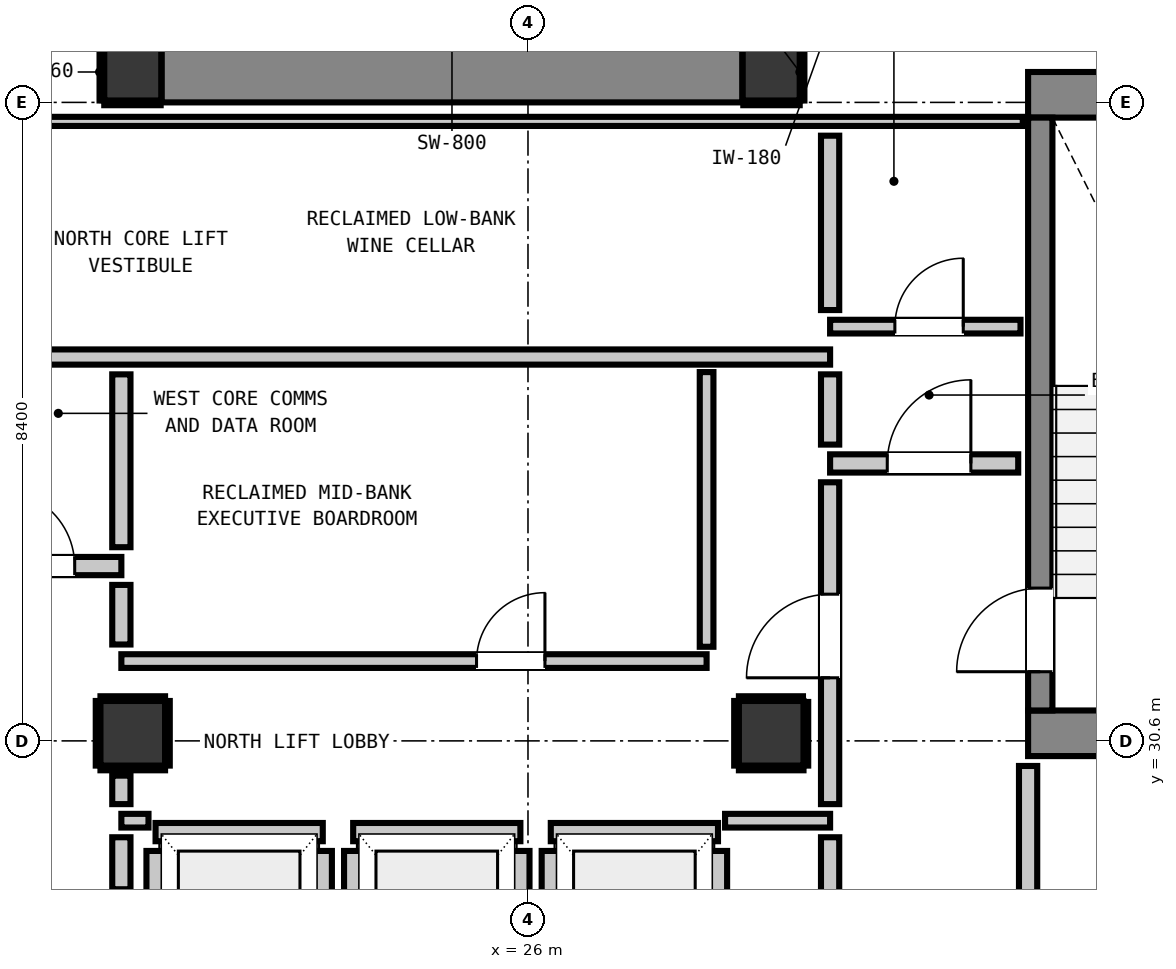
"""IFC4 building model, lengths in metres.
Left out: names, types, materials, properties, quantities, classifications, styles, units other than length and angle.
Written with IfcOpenShell. Run it as: python <this file> out.ifc"""

import sys

from ifc_helpers import new_model, si_unit, direction, frame, frame_2d, origin, origin_2d, place, context, subcontext, project, spatial, rectangle, extrude, element, fill, save


model = new_model("IFC4")
c1 = context("Model", 3, precision=1e-05, world=origin(), true_north=direction((0.0, 1.0)))
c2 = subcontext(c1, "Body", "Model", "MODEL_VIEW")
j1 = project(units=[si_unit("LENGTHUNIT", "METRE"), si_unit("PLANEANGLEUNIT", "RADIAN")], contexts=[c1])
p1 = place(None, origin())
s1 = spatial("IfcSite", under=j1, at=p1, CompositionType="ELEMENT")
p2 = place(p1, origin())
s2 = spatial("IfcBuilding", under=s1, at=p2, CompositionType="ELEMENT")
p3 = place(p2, frame((0.0, 0.0, 206.76)))
s3 = spatial("IfcBuildingStorey", under=s2, at=p3, CompositionType="ELEMENT", Elevation=206.76)
for number, where, z_axis, x_axis in (
    (1, (20.8, 39.4, 0.0), (0.0, 0.0, 1.0), (1.0, 0.0, 0.0)),
    (2, (29.2, 39.4, 0.0), (0.0, 0.0, 1.0), (1.0, 0.0, 0.0)),
):
    element("IfcColumn", number, at=place(p3, frame(where, z_axis=z_axis, x_axis=x_axis)), inside=s3, PredefinedType="COLUMN", context=c2, shape_type="SweptSolid", body=[
        extrude(rectangle(XDim=0.75, YDim=0.75, at=origin_2d()), origin(), (0.0, 0.0, 1.0), 3.32),
    ])
p4 = place(p3, frame((32.58, 39.1, 0.0), z_axis=(0.0, 0.0, 1.0), x_axis=(1.0, 0.0, 0.0)))
e3 = element("IfcWall", 3, at=p4, inside=s3, PredefinedType="SHEAR", context=c2, shape_type="SweptSolid", body=[
    extrude(rectangle(XDim=4.08, YDim=0.6, at=frame_2d((2.04, 0.0))), origin(), (0.0, 0.0, 1.0), 3.32),
])
p5 = place(p3, frame((32.58, 30.7, 0.0), z_axis=(0.0, 0.0, 1.0), x_axis=(1.0, 0.0, 0.0)))
e4 = element("IfcWall", 4, at=p5, inside=s3, PredefinedType="SHEAR", context=c2, shape_type="SweptSolid", body=[
    extrude(rectangle(XDim=3.54, YDim=0.6, at=frame_2d((1.77, 0.0))), origin(), (0.0, 0.0, 1.0), 3.32),
])
p6 = place(p3, frame((21.18, 39.4, 0.0), z_axis=(0.0, 0.0, 1.0), x_axis=(1.0, 0.0, 0.0)))
e5 = element("IfcWall", 5, at=p6, inside=s3, PredefinedType="SHEAR", context=c2, shape_type="SweptSolid", body=[
    extrude(rectangle(XDim=7.64, YDim=0.8, at=frame_2d((3.82, 0.0))), origin(), (0.0, 0.0, 1.0), 3.32),
])
p7 = place(p3, frame((32.74, 31.0, 0.0), z_axis=(0.0, 0.0, 1.0), x_axis=(0.0, 1.0, 0.0)))
e6 = element("IfcWall", 6, at=p7, inside=s3, PredefinedType="SHEAR", context=c2, shape_type="SweptSolid", body=[
    extrude(rectangle(XDim=7.8, YDim=0.32, at=frame_2d((3.9, 0.0))), origin(), (0.0, 0.0, 1.0), 3.32),
])
p8 = place(p7, frame((0.51, 0.0, 0.0)))
e7 = element("IfcOpeningElement", 7, at=p8, cuts=e6, PredefinedType="OPENING", context=c2, shape_type="SweptSolid", body=[
    extrude(rectangle(XDim=1.1, YDim=2.15, at=frame_2d((0.55, 1.075))), frame((0.0, 0.17, 0.0), z_axis=(0.0, -1.0, 0.0), x_axis=(1.0, 0.0, 0.0)), (0.0, 0.0, 1.0), 0.34),
])
for number, where, z_axis, x_axis in (
    (8, (20.8, 30.7, 0.0), (0.0, 0.0, 1.0), (1.0, 0.0, 0.0)),
    (9, (29.2, 30.7, 0.0), (0.0, 0.0, 1.0), (1.0, 0.0, 0.0)),
):
    element("IfcColumn", number, at=place(p3, frame(where, z_axis=z_axis, x_axis=x_axis)), inside=s3, PredefinedType="COLUMN", context=c2, shape_type="SweptSolid", body=[
        extrude(rectangle(XDim=0.85, YDim=0.85, at=origin_2d()), origin(), (0.0, 0.0, 1.0), 3.32),
    ])
p9 = place(p3, frame((21.1, 29.4, 0.0), z_axis=(0.0, 0.0, 1.0), x_axis=(1.0, 0.0, 0.0)))
e10 = element("IfcWall", 10, at=p9, inside=s3, PredefinedType="PARTITIONING", context=c2, shape_type="SweptSolid", body=[
    extrude(rectangle(XDim=2.2, YDim=0.24, at=frame_2d((1.1, 0.0))), origin(), (0.0, 0.0, 1.0), 2.9),
])
p10 = place(p3, frame((21.1, 27.048, 0.0), z_axis=(0.0, 0.0, 1.0), x_axis=(0.0, 1.0, 0.0)))
e11 = element("IfcWall", 11, at=p10, inside=s3, PredefinedType="PARTITIONING", context=c2, shape_type="SweptSolid", body=[
    extrude(rectangle(XDim=2.104, YDim=0.24, at=frame_2d((1.052, 0.0))), origin(), (0.0, 0.0, 1.0), 0.905),
])
p11 = place(p3, frame((23.3, 27.048, 0.0), z_axis=(0.0, 0.0, 1.0), x_axis=(0.0, 1.0, 0.0)))
e12 = element("IfcWall", 12, at=p11, inside=s3, PredefinedType="PARTITIONING", context=c2, shape_type="SweptSolid", body=[
    extrude(rectangle(XDim=2.104, YDim=0.24, at=frame_2d((1.052, 0.0))), origin(), (0.0, 0.0, 1.0), 2.9),
])
p12 = place(p3, frame((23.7, 29.4, 0.0), z_axis=(0.0, 0.0, 1.0), x_axis=(1.0, 0.0, 0.0)))
e13 = element("IfcWall", 13, at=p12, inside=s3, PredefinedType="PARTITIONING", context=c2, shape_type="SweptSolid", body=[
    extrude(rectangle(XDim=2.2, YDim=0.24, at=frame_2d((1.1, 0.0))), origin(), (0.0, 0.0, 1.0), 2.9),
])
for number, where, z_axis, x_axis in (
    (14, (23.7, 27.048, 0.0), (0.0, 0.0, 1.0), (0.0, 1.0, 0.0)),
    (15, (25.9, 27.048, 0.0), (0.0, 0.0, 1.0), (0.0, 1.0, 0.0)),
):
    element("IfcWall", number, at=place(p3, frame(where, z_axis=z_axis, x_axis=x_axis)), inside=s3, PredefinedType="PARTITIONING", context=c2, shape_type="SweptSolid", body=[
        extrude(rectangle(XDim=2.104, YDim=0.24, at=frame_2d((1.052, 0.0))), origin(), (0.0, 0.0, 1.0), 2.9),
    ])
p13 = place(p3, frame((26.3, 29.4, 0.0), z_axis=(0.0, 0.0, 1.0), x_axis=(1.0, 0.0, 0.0)))
e16 = element("IfcWall", 16, at=p13, inside=s3, PredefinedType="PARTITIONING", context=c2, shape_type="SweptSolid", body=[
    extrude(rectangle(XDim=2.2, YDim=0.24, at=frame_2d((1.1, 0.0))), origin(), (0.0, 0.0, 1.0), 2.9),
])
p14 = place(p3, frame((26.3, 27.048, 0.0), z_axis=(0.0, 0.0, 1.0), x_axis=(0.0, 1.0, 0.0)))
e17 = element("IfcWall", 17, at=p14, inside=s3, PredefinedType="PARTITIONING", context=c2, shape_type="SweptSolid", body=[
    extrude(rectangle(XDim=2.104, YDim=0.24, at=frame_2d((1.052, 0.0))), origin(), (0.0, 0.0, 1.0), 2.9),
])
p15 = place(p3, frame((28.5, 27.33, 0.0), z_axis=(0.0, 0.0, 1.0), x_axis=(0.0, 1.0, 0.0)))
e18 = element("IfcWall", 18, at=p15, inside=s3, PredefinedType="PARTITIONING", context=c2, shape_type="SweptSolid", body=[
    extrude(rectangle(XDim=1.822, YDim=0.24, at=frame_2d((0.911, 0.0))), origin(), (0.0, 0.0, 1.0), 0.905),
])
p16 = place(p3, frame((17.45, 32.9, 0.0), z_axis=(0.0, 0.0, 1.0), x_axis=(1.0, 0.0, 0.0)))
e19 = element("IfcWall", 19, at=p16, inside=s3, PredefinedType="PARTITIONING", context=c2, shape_type="SweptSolid", body=[
    extrude(rectangle(XDim=3.2, YDim=0.24, at=frame_2d((1.6, 0.0))), origin(), (0.0, 0.0, 1.0), 2.9),
])
p17 = place(p16, frame((0.159, 0.0, 0.0)))
e20 = element("IfcOpeningElement", 20, at=p17, cuts=e19, PredefinedType="OPENING", context=c2, shape_type="SweptSolid", body=[
    extrude(rectangle(XDim=1.1, YDim=2.15, at=frame_2d((0.55, 1.075))), frame((0.0, 0.13, 0.0), z_axis=(0.0, -1.0, 0.0), x_axis=(1.0, 0.0, 0.0)), (0.0, 0.0, 1.0), 0.26),
])
p18 = place(p16, frame((1.586, 0.0, 0.0)))
e21 = element("IfcOpeningElement", 21, at=p18, cuts=e19, PredefinedType="OPENING", context=c2, shape_type="SweptSolid", body=[
    extrude(rectangle(XDim=1.0, YDim=2.15, at=frame_2d((0.5, 1.075))), frame((0.0, 0.13, 0.0), z_axis=(0.0, -1.0, 0.0), x_axis=(1.0, 0.0, 0.0)), (0.0, 0.0, 1.0), 0.26),
])
p19 = place(p3, frame((29.975, 34.25, 0.0), z_axis=(0.0, 0.0, 1.0), x_axis=(1.0, 0.0, 0.0)))
e22 = element("IfcWall", 22, at=p19, inside=s3, PredefinedType="PARTITIONING", context=c2, shape_type="SweptSolid", body=[
    extrude(rectangle(XDim=2.475, YDim=0.24, at=frame_2d((1.237, 0.0))), origin(), (0.0, 0.0, 1.0), 2.9),
])
p20 = place(p19, frame((0.752, 0.0, 0.0)))
e23 = element("IfcOpeningElement", 23, at=p20, cuts=e22, PredefinedType="OPENING", context=c2, shape_type="SweptSolid", body=[
    extrude(rectangle(XDim=1.1, YDim=2.15, at=frame_2d((0.55, 1.075))), frame((0.0, 0.13, 0.0), z_axis=(0.0, -1.0, 0.0), x_axis=(1.0, 0.0, 0.0)), (0.0, 0.0, 1.0), 0.26),
])
p21 = place(p3, frame((18.95, 35.65, 0.0), z_axis=(0.0, 0.0, 1.0), x_axis=(1.0, 0.0, 0.0)))
e24 = element("IfcWall", 24, at=p21, inside=s3, PredefinedType="PARTITIONING", context=c2, shape_type="SweptSolid", body=[
    extrude(rectangle(XDim=11.025, YDim=0.2, at=frame_2d((5.513, 0.0))), origin(), (0.0, 0.0, 1.0), 2.9),
])
p22 = place(p3, frame((20.65, 29.55, 0.0), z_axis=(0.0, 0.0, 1.0), x_axis=(1.0, 0.0, 0.0)))
e25 = element("IfcWall", 25, at=p22, inside=s3, PredefinedType="PARTITIONING", context=c2, shape_type="SweptSolid", body=[
    extrude(rectangle(XDim=0.357, YDim=0.18, at=frame_2d((0.179, 0.0))), origin(), (0.0, 0.0, 1.0), 2.9),
])
p23 = place(p3, frame((28.593, 29.55, 0.0), z_axis=(0.0, 0.0, 1.0), x_axis=(1.0, 0.0, 0.0)))
e26 = element("IfcWall", 26, at=p23, inside=s3, PredefinedType="PARTITIONING", context=c2, shape_type="SweptSolid", body=[
    extrude(rectangle(XDim=1.382, YDim=0.18, at=frame_2d((0.691, 0.0))), origin(), (0.0, 0.0, 1.0), 2.9),
])
p24 = place(p3, frame((20.65, 31.65, 0.0), z_axis=(0.0, 0.0, 1.0), x_axis=(1.0, 0.0, 0.0)))
e27 = element("IfcWall", 27, at=p24, inside=s3, PredefinedType="PARTITIONING", context=c2, shape_type="SweptSolid", body=[
    extrude(rectangle(XDim=7.7, YDim=0.18, at=frame_2d((3.85, 0.0))), origin(), (0.0, 0.0, 1.0), 2.9),
])
p25 = place(p24, frame((4.673, 0.0, 0.0)))
e28 = element("IfcOpeningElement", 28, at=p25, cuts=e27, PredefinedType="OPENING", context=c2, shape_type="SweptSolid", body=[
    extrude(rectangle(XDim=0.9, YDim=2.1, at=frame_2d((0.45, 1.05))), frame((0.0, 0.1, 0.0), z_axis=(0.0, -1.0, 0.0), x_axis=(1.0, 0.0, 0.0)), (0.0, 0.0, 1.0), 0.2),
])
p26 = place(p3, frame((29.975, 36.05, 0.0), z_axis=(0.0, 0.0, 1.0), x_axis=(1.0, 0.0, 0.0)))
e29 = element("IfcWall", 29, at=p26, inside=s3, PredefinedType="PARTITIONING", context=c2, shape_type="SweptSolid", body=[
    extrude(rectangle(XDim=2.505, YDim=0.18, at=frame_2d((1.252, 0.0))), origin(), (0.0, 0.0, 1.0), 2.9),
])
p27 = place(p26, frame((0.852, 0.0, 0.0)))
e30 = element("IfcOpeningElement", 30, at=p27, cuts=e29, PredefinedType="OPENING", context=c2, shape_type="SweptSolid", body=[
    extrude(rectangle(XDim=0.9, YDim=2.1, at=frame_2d((0.45, 1.05))), frame((0.0, 0.1, 0.0), z_axis=(0.0, -1.0, 0.0), x_axis=(1.0, 0.0, 0.0)), (0.0, 0.0, 1.0), 0.2),
])
p28 = place(p3, frame((18.95, 38.75, 0.0), z_axis=(0.0, 0.0, 1.0), x_axis=(1.0, 0.0, 0.0)))
e31 = element("IfcWall", 31, at=p28, inside=s3, PredefinedType="PARTITIONING", context=c2, shape_type="SweptSolid", body=[
    extrude(rectangle(XDim=13.56, YDim=0.12, at=frame_2d((6.78, 0.0))), origin(), (0.0, 0.0, 1.0), 0.905),
])
p29 = place(p3, frame((20.65, 28.648, 0.0), z_axis=(0.0, 0.0, 1.0), x_axis=(0.0, 1.0, 0.0)))
e32 = element("IfcWall", 32, at=p29, inside=s3, PredefinedType="PARTITIONING", context=c2, shape_type="SweptSolid", body=[
    extrude(rectangle(XDim=0.684, YDim=0.24, at=frame_2d((0.342, 0.0))), origin(), (0.0, 0.0, 1.0), 0.905),
])
p30 = place(p3, frame((20.65, 29.768, 0.0), z_axis=(0.0, 0.0, 1.0), x_axis=(0.0, 1.0, 0.0)))
e33 = element("IfcWall", 33, at=p30, inside=s3, PredefinedType="PARTITIONING", context=c2, shape_type="SweptSolid", body=[
    extrude(rectangle(XDim=0.375, YDim=0.24, at=frame_2d((0.188, 0.0))), origin(), (0.0, 0.0, 1.0), 0.905),
])
p31 = place(p3, frame((20.65, 31.868, 0.0), z_axis=(0.0, 0.0, 1.0), x_axis=(0.0, 1.0, 0.0)))
e34 = element("IfcWall", 34, at=p31, inside=s3, PredefinedType="PARTITIONING", context=c2, shape_type="SweptSolid", body=[
    extrude(rectangle(XDim=0.784, YDim=0.24, at=frame_2d((0.392, 0.0))), origin(), (0.0, 0.0, 1.0), 0.905),
])
p32 = place(p3, frame((20.65, 33.148, 0.0), z_axis=(0.0, 0.0, 1.0), x_axis=(0.0, 1.0, 0.0)))
e35 = element("IfcWall", 35, at=p32, inside=s3, PredefinedType="PARTITIONING", context=c2, shape_type="SweptSolid", body=[
    extrude(rectangle(XDim=2.274, YDim=0.24, at=frame_2d((1.137, 0.0))), origin(), (0.0, 0.0, 1.0), 0.905),
])
p33 = place(p3, frame((29.975, 25.648, 0.0), z_axis=(0.0, 0.0, 1.0), x_axis=(0.0, 1.0, 0.0)))
e36 = element("IfcWall", 36, at=p33, inside=s3, PredefinedType="PARTITIONING", context=c2, shape_type="SweptSolid", body=[
    extrude(rectangle(XDim=3.684, YDim=0.24, at=frame_2d((1.842, 0.0))), origin(), (0.0, 0.0, 1.0), 2.9),
])
p34 = place(p3, frame((29.975, 29.768, 0.0), z_axis=(0.0, 0.0, 1.0), x_axis=(0.0, 1.0, 0.0)))
e37 = element("IfcWall", 37, at=p34, inside=s3, PredefinedType="PARTITIONING", context=c2, shape_type="SweptSolid", body=[
    extrude(rectangle(XDim=4.234, YDim=0.24, at=frame_2d((2.117, 0.0))), origin(), (0.0, 0.0, 1.0), 2.9),
])
p35 = place(p34, frame((1.662, 0.0, 0.0)))
e38 = element("IfcOpeningElement", 38, at=p35, cuts=e37, PredefinedType="OPENING", context=c2, shape_type="SweptSolid", body=[
    extrude(rectangle(XDim=1.1, YDim=2.15, at=frame_2d((0.55, 1.075))), frame((0.0, 0.13, 0.0), z_axis=(0.0, -1.0, 0.0), x_axis=(1.0, 0.0, 0.0)), (0.0, 0.0, 1.0), 0.26),
])
p36 = place(p3, frame((29.975, 34.498, 0.0), z_axis=(0.0, 0.0, 1.0), x_axis=(0.0, 1.0, 0.0)))
e39 = element("IfcWall", 39, at=p36, inside=s3, PredefinedType="PARTITIONING", context=c2, shape_type="SweptSolid", body=[
    extrude(rectangle(XDim=0.924, YDim=0.24, at=frame_2d((0.462, 0.0))), origin(), (0.0, 0.0, 1.0), 2.9),
])
p37 = place(p3, frame((29.975, 36.268, 0.0), z_axis=(0.0, 0.0, 1.0), x_axis=(0.0, 1.0, 0.0)))
e40 = element("IfcWall", 40, at=p37, inside=s3, PredefinedType="PARTITIONING", context=c2, shape_type="SweptSolid", body=[
    extrude(rectangle(XDim=2.294, YDim=0.24, at=frame_2d((1.147, 0.0))), origin(), (0.0, 0.0, 1.0), 2.9),
])
p38 = place(p3, frame((32.58, 25.648, 0.0), z_axis=(0.0, 0.0, 1.0), x_axis=(0.0, 1.0, 0.0)))
e41 = element("IfcWall", 41, at=p38, inside=s3, PredefinedType="PARTITIONING", context=c2, shape_type="SweptSolid", body=[
    extrude(rectangle(XDim=4.622, YDim=0.24, at=frame_2d((2.311, 0.0))), origin(), (0.0, 0.0, 1.0), 2.9),
])
p39 = place(p3, frame((28.35, 31.838, 0.0), z_axis=(0.0, 0.0, 1.0), x_axis=(0.0, 1.0, 0.0)))
e42 = element("IfcWall", 42, at=p39, inside=s3, PredefinedType="PARTITIONING", context=c2, shape_type="SweptSolid", body=[
    extrude(rectangle(XDim=3.614, YDim=0.18, at=frame_2d((1.807, 0.0))), origin(), (0.0, 0.0, 1.0), 2.9),
])
p40 = place(p3, frame((20.425, 38.993, 0.0), z_axis=(0.0, 0.0, 1.0), x_axis=(1.0, 0.0, 0.0)))
e43 = element("IfcWall", 43, at=p40, inside=s3, PredefinedType="PARTITIONING", context=c2, shape_type="SweptSolid", body=[
    extrude(rectangle(XDim=0.742, YDim=0.06, at=frame_2d((0.371, 0.0))), origin(), (0.0, 0.0, 1.0), 0.905),
])
p41 = place(p3, frame((20.393, 39.025, 0.0), z_axis=(0.0, 0.0, 1.0), x_axis=(0.0, 1.0, 0.0)))
e44 = element("IfcWall", 44, at=p41, inside=s3, PredefinedType="PARTITIONING", context=c2, shape_type="SweptSolid", body=[
    extrude(rectangle(XDim=0.75, YDim=0.06, at=frame_2d((0.375, 0.0))), origin(), (0.0, 0.0, 1.0), 0.905),
])
p42 = place(p3, frame((28.833, 38.993, 0.0), z_axis=(0.0, 0.0, 1.0), x_axis=(1.0, 0.0, 0.0)))
e45 = element("IfcWall", 45, at=p42, inside=s3, PredefinedType="PARTITIONING", context=c2, shape_type="SweptSolid", body=[
    extrude(rectangle(XDim=0.742, YDim=0.06, at=frame_2d((0.371, 0.0))), origin(), (0.0, 0.0, 1.0), 0.905),
])
p43 = place(p3, frame((29.607, 39.025, 0.0), z_axis=(0.0, 0.0, 1.0), x_axis=(0.0, 1.0, 0.0)))
e46 = element("IfcWall", 46, at=p43, inside=s3, PredefinedType="PARTITIONING", context=c2, shape_type="SweptSolid", body=[
    extrude(rectangle(XDim=0.75, YDim=0.06, at=frame_2d((0.375, 0.0))), origin(), (0.0, 0.0, 1.0), 0.905),
])
for number, where, z_axis, x_axis in (
    (47, (20.375, 30.243, 0.0), (0.0, 0.0, 1.0), (1.0, 0.0, 0.0)),
    (48, (20.375, 31.157, 0.0), (0.0, 0.0, 1.0), (1.0, 0.0, 0.0)),
    (49, (20.343, 30.275, 0.0), (0.0, 0.0, 1.0), (0.0, 1.0, 0.0)),
    (50, (21.257, 30.275, 0.0), (0.0, 0.0, 1.0), (0.0, 1.0, 0.0)),
    (51, (28.775, 30.243, 0.0), (0.0, 0.0, 1.0), (1.0, 0.0, 0.0)),
):
    element("IfcWall", number, at=place(p3, frame(where, z_axis=z_axis, x_axis=x_axis)), inside=s3, PredefinedType="PARTITIONING", context=c2, shape_type="SweptSolid", body=[
        extrude(rectangle(XDim=0.85, YDim=0.06, at=frame_2d((0.425, 0.0))), origin(), (0.0, 0.0, 1.0), 0.905),
    ])
p44 = place(p3, frame((28.775, 31.157, 0.0), z_axis=(0.0, 0.0, 1.0), x_axis=(1.0, 0.0, 0.0)))
e52 = element("IfcWall", 52, at=p44, inside=s3, PredefinedType="PARTITIONING", context=c2, shape_type="SweptSolid", body=[
    extrude(rectangle(XDim=0.843, YDim=0.06, at=frame_2d((0.421, 0.0))), origin(), (0.0, 0.0, 1.0), 0.905),
])
p45 = place(p3, frame((28.743, 30.275, 0.0), z_axis=(0.0, 0.0, 1.0), x_axis=(0.0, 1.0, 0.0)))
e53 = element("IfcWall", 53, at=p45, inside=s3, PredefinedType="PARTITIONING", context=c2, shape_type="SweptSolid", body=[
    extrude(rectangle(XDim=0.85, YDim=0.06, at=frame_2d((0.425, 0.0))), origin(), (0.0, 0.0, 1.0), 0.905),
])
p46 = place(p3, frame((29.657, 30.275, 0.0), z_axis=(0.0, 0.0, 1.0), x_axis=(0.0, 1.0, 0.0)))
e54 = element("IfcWall", 54, at=p46, inside=s3, PredefinedType="PARTITIONING", context=c2, shape_type="SweptSolid", body=[
    extrude(rectangle(XDim=0.837, YDim=0.06, at=frame_2d((0.418, 0.0))), origin(), (0.0, 0.0, 1.0), 0.905),
])
p47 = place(p8, origin())
e55 = element("IfcDoor", 55, at=p47, inside=s3, OperationType="SINGLE_SWING_LEFT", PredefinedType="DOOR", context=c2, shape_type="SweptSolid", body=[
    extrude(rectangle(XDim=1.1, YDim=2.15, at=frame_2d((0.55, 1.075))), frame((0.0, 0.025, 0.0), z_axis=(0.0, -1.0, 0.0), x_axis=(1.0, 0.0, 0.0)), (0.0, 0.0, 1.0), 0.05),
])
fill(e7, e55)
p48 = place(p35, origin())
e56 = element("IfcDoor", 56, at=p48, inside=s3, OperationType="SINGLE_SWING_LEFT", PredefinedType="DOOR", context=c2, shape_type="SweptSolid", body=[
    extrude(rectangle(XDim=1.1, YDim=2.15, at=frame_2d((0.55, 1.075))), frame((0.0, 0.025, 0.0), z_axis=(0.0, -1.0, 0.0), x_axis=(1.0, 0.0, 0.0)), (0.0, 0.0, 1.0), 0.05),
])
fill(e38, e56)
p49 = place(p20, origin())
e57 = element("IfcDoor", 57, at=p49, inside=s3, OperationType="SINGLE_SWING_RIGHT", PredefinedType="DOOR", context=c2, shape_type="SweptSolid", body=[
    extrude(rectangle(XDim=1.1, YDim=2.15, at=frame_2d((0.55, 1.075))), frame((0.0, 0.025, 0.0), z_axis=(0.0, -1.0, 0.0), x_axis=(1.0, 0.0, 0.0)), (0.0, 0.0, 1.0), 0.05),
])
fill(e23, e57)
p50 = place(p18, origin())
e58 = element("IfcDoor", 58, at=p50, inside=s3, OperationType="SINGLE_SWING_LEFT", PredefinedType="DOOR", context=c2, shape_type="SweptSolid", body=[
    extrude(rectangle(XDim=1.0, YDim=2.15, at=frame_2d((0.5, 1.075))), frame((0.0, 0.025, 0.0), z_axis=(0.0, -1.0, 0.0), x_axis=(1.0, 0.0, 0.0)), (0.0, 0.0, 1.0), 0.05),
])
fill(e21, e58)
p51 = place(p27, origin())
e59 = element("IfcDoor", 59, at=p51, inside=s3, OperationType="SINGLE_SWING_RIGHT", PredefinedType="DOOR", context=c2, shape_type="SweptSolid", body=[
    extrude(rectangle(XDim=0.9, YDim=2.1, at=frame_2d((0.45, 1.05))), frame((0.0, 0.025, 0.0), z_axis=(0.0, -1.0, 0.0), x_axis=(1.0, 0.0, 0.0)), (0.0, 0.0, 1.0), 0.05),
])
fill(e30, e59)
p52 = place(p25, origin())
e60 = element("IfcDoor", 60, at=p52, inside=s3, OperationType="SINGLE_SWING_RIGHT", PredefinedType="DOOR", context=c2, shape_type="SweptSolid", body=[
    extrude(rectangle(XDim=0.9, YDim=2.1, at=frame_2d((0.45, 1.05))), frame((0.0, 0.025, 0.0), z_axis=(0.0, -1.0, 0.0), x_axis=(1.0, 0.0, 0.0)), (0.0, 0.0, 1.0), 0.05),
])
fill(e28, e60)
save(model, sys.argv[1])
